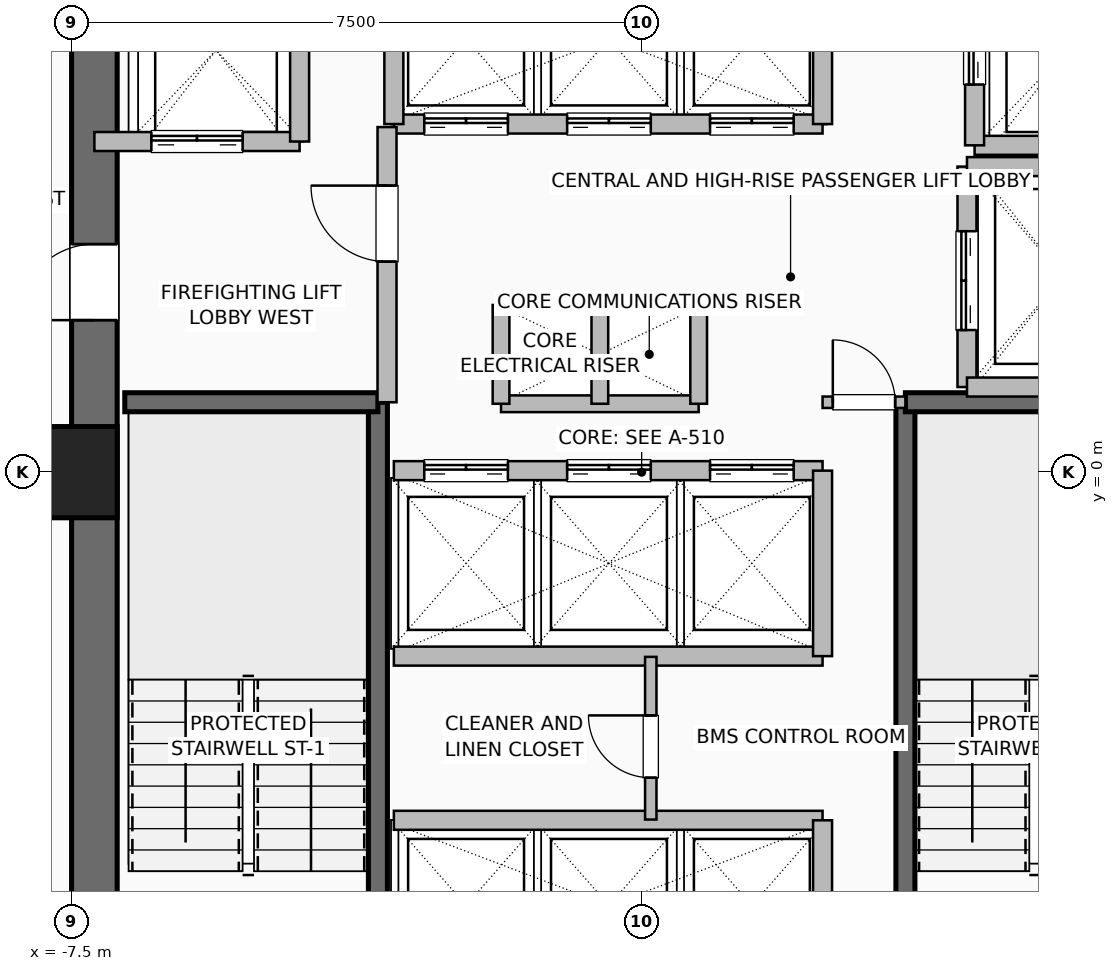
"""IFC4 building model, lengths in metres.
Left out: names, types, materials, properties, quantities, classifications, styles, units other than length and angle.
Written with IfcOpenShell. Run it as: python <this file> out.ifc"""

import sys

from ifc_helpers import new_model, si_unit, direction, frame, frame_2d, origin, origin_2d, place, context, subcontext, project, spatial, rectangle, hollow_rectangle, extrude, element, fill, save


model = new_model("IFC4")
c1 = context("Model", 3, precision=1e-05, world=origin(), true_north=direction((0.0, 1.0)))
c2 = subcontext(c1, "Body", "Model", "MODEL_VIEW")
j1 = project(units=[si_unit("LENGTHUNIT", "METRE"), si_unit("PLANEANGLEUNIT", "RADIAN")], contexts=[c1])
p1 = place(None, origin())
s1 = spatial("IfcSite", under=j1, at=p1, CompositionType="ELEMENT")
p2 = place(p1, origin())
s2 = spatial("IfcBuilding", under=s1, at=p2, CompositionType="ELEMENT")
p3 = place(p2, frame((0.0, 0.0, 34.0)))
s3 = spatial("IfcBuildingStorey", under=s2, at=p3, CompositionType="ELEMENT", Elevation=34.0)
p4 = place(p3, frame((-7.5, 0.0, 0.0), z_axis=(0.0, 0.0, 1.0), x_axis=(1.0, 0.0, 0.0)))
e1 = element("IfcColumn", 1, at=p4, inside=s3, PredefinedType="COLUMN", context=c2, shape_type="SweptSolid", body=[
    extrude(hollow_rectangle(XDim=1.2, YDim=1.2, WallThickness=0.055, at=origin_2d()), origin(), (0.0, 0.0, 1.0), 3.5),
])
p5 = place(p3, frame((-7.2, -7.5, 0.0), z_axis=(0.0, 0.0, 1.0), x_axis=(0.0, 1.0, 0.0)))
e2 = element("IfcWall", 2, at=p5, inside=s3, PredefinedType="SHEAR", context=c2, shape_type="SweptSolid", body=[
    extrude(rectangle(XDim=15.0, YDim=0.6, at=frame_2d((7.5, 0.0))), origin(), (0.0, 0.0, 1.0), 3.25),
])
p6 = place(p5, frame((9.5, 0.0, 0.0)))
e3 = element("IfcOpeningElement", 3, at=p6, cuts=e2, PredefinedType="OPENING", context=c2, shape_type="SweptSolid", body=[
    extrude(rectangle(XDim=1.0, YDim=2.08, at=frame_2d((0.5, 1.04))), frame((0.0, 0.31, 0.0), z_axis=(0.0, -1.0, 0.0), x_axis=(1.0, 0.0, 0.0)), (0.0, 0.0, 1.0), 0.62),
])
p7 = place(p3, frame((-3.47, -6.8, 0.0), z_axis=(0.0, 0.0, 1.0), x_axis=(0.0, 1.0, 0.0)))
e4 = element("IfcWall", 4, at=p7, inside=s3, PredefinedType="SHEAR", context=c2, shape_type="SweptSolid", body=[
    extrude(rectangle(XDim=7.72, YDim=0.25, at=frame_2d((3.86, 0.0))), origin(), (0.0, 0.0, 1.0), 3.25),
])
p8 = place(p3, frame((-6.8, 0.92, 0.0), z_axis=(0.0, 0.0, 1.0), x_axis=(1.0, 0.0, 0.0)))
e5 = element("IfcWall", 5, at=p8, inside=s3, PredefinedType="SHEAR", context=c2, shape_type="SweptSolid", body=[
    extrude(rectangle(XDim=3.33, YDim=0.25, at=frame_2d((1.665, 0.0))), origin(), (0.0, 0.0, 1.0), 3.25),
])
p9 = place(p3, frame((3.47, -6.8, 0.0), z_axis=(0.0, 0.0, 1.0), x_axis=(0.0, 1.0, 0.0)))
e6 = element("IfcWall", 6, at=p9, inside=s3, PredefinedType="SHEAR", context=c2, shape_type="SweptSolid", body=[
    extrude(rectangle(XDim=7.72, YDim=0.25, at=frame_2d((3.86, 0.0))), origin(), (0.0, 0.0, 1.0), 3.25),
])
p10 = place(p3, frame((3.47, 0.92, 0.0), z_axis=(0.0, 0.0, 1.0), x_axis=(1.0, 0.0, 0.0)))
e7 = element("IfcWall", 7, at=p10, inside=s3, PredefinedType="SHEAR", context=c2, shape_type="SweptSolid", body=[
    extrude(rectangle(XDim=3.33, YDim=0.25, at=frame_2d((1.665, 0.0))), origin(), (0.0, 0.0, 1.0), 3.25),
])
for number, where, z_axis, x_axis in (
    (8, (-1.85, 2.2, 0.0), (0.0, 0.0, 1.0), (1.0, 0.0, 0.0)),
    (9, (-1.85, 0.9, 0.0), (0.0, 0.0, 1.0), (1.0, 0.0, 0.0)),
):
    element("IfcWall", number, at=place(p3, frame(where, z_axis=z_axis, x_axis=x_axis)), inside=s3, PredefinedType="PARTITIONING", context=c2, shape_type="SweptSolid", body=[
        extrude(rectangle(XDim=2.6, YDim=0.22, at=frame_2d((1.3, 0.0))), origin(), (0.0, 0.0, 1.0), 3.25),
    ])
for number, where, z_axis, x_axis in (
    (10, (-0.55, 0.9, 0.0), (0.0, 0.0, 1.0), (0.0, 1.0, 0.0)),
    (11, (0.75, 0.9, 0.0), (0.0, 0.0, 1.0), (0.0, 1.0, 0.0)),
    (12, (-1.85, 0.9, 0.0), (0.0, 0.0, 1.0), (0.0, 1.0, 0.0)),
):
    element("IfcWall", number, at=place(p3, frame(where, z_axis=z_axis, x_axis=x_axis)), inside=s3, PredefinedType="PARTITIONING", context=c2, shape_type="SweptSolid", body=[
        extrude(rectangle(XDim=1.3, YDim=0.22, at=frame_2d((0.65, 0.0))), origin(), (0.0, 0.0, 1.0), 3.25),
    ])
p11 = place(p3, frame((-3.26, -4.58, 0.0), z_axis=(0.0, 0.0, 1.0), x_axis=(1.0, 0.0, 0.0)))
e13 = element("IfcWall", 13, at=p11, inside=s3, PredefinedType="SHEAR", context=c2, shape_type="SweptSolid", body=[
    extrude(rectangle(XDim=5.64, YDim=0.25, at=frame_2d((2.82, 0.0))), origin(), (0.0, 0.0, 1.0), 3.25),
])
p12 = place(p3, frame((2.38, -6.8, 0.0), z_axis=(0.0, 0.0, 1.0), x_axis=(0.0, 1.0, 0.0)))
e14 = element("IfcWall", 14, at=p12, inside=s3, PredefinedType="SHEAR", context=c2, shape_type="SweptSolid", body=[
    extrude(rectangle(XDim=2.22, YDim=0.25, at=frame_2d((1.11, 0.0))), origin(), (0.0, 0.0, 1.0), 3.25),
])
p13 = place(p3, frame((-3.26, 0.02, 0.0), z_axis=(0.0, 0.0, 1.0), x_axis=(1.0, 0.0, 0.0)))
e15 = element("IfcWall", 15, at=p13, inside=s3, PredefinedType="SHEAR", context=c2, shape_type="SweptSolid", body=[
    extrude(rectangle(XDim=5.64, YDim=0.25, at=frame_2d((2.82, 0.0))), origin(), (0.0, 0.0, 1.0), 3.25),
])
p14 = place(p13, frame((0.4, 0.0, 0.0)))
e16 = element("IfcOpeningElement", 16, at=p14, cuts=e15, PredefinedType="OPENING", context=c2, shape_type="SweptSolid", body=[
    extrude(rectangle(XDim=1.1, YDim=2.2, at=frame_2d((0.55, 1.1))), frame((0.0, 0.135, 0.0), z_axis=(0.0, -1.0, 0.0), x_axis=(1.0, 0.0, 0.0)), (0.0, 0.0, 1.0), 0.27),
])
p15 = place(p13, frame((2.28, 0.0, 0.0)))
e17 = element("IfcOpeningElement", 17, at=p15, cuts=e15, PredefinedType="OPENING", context=c2, shape_type="SweptSolid", body=[
    extrude(rectangle(XDim=1.1, YDim=2.2, at=frame_2d((0.55, 1.1))), frame((0.0, 0.135, 0.0), z_axis=(0.0, -1.0, 0.0), x_axis=(1.0, 0.0, 0.0)), (0.0, 0.0, 1.0), 0.27),
])
p16 = place(p13, frame((4.16, 0.0, 0.0)))
e18 = element("IfcOpeningElement", 18, at=p16, cuts=e15, PredefinedType="OPENING", context=c2, shape_type="SweptSolid", body=[
    extrude(rectangle(XDim=1.1, YDim=2.2, at=frame_2d((0.55, 1.1))), frame((0.0, 0.135, 0.0), z_axis=(0.0, -1.0, 0.0), x_axis=(1.0, 0.0, 0.0)), (0.0, 0.0, 1.0), 0.27),
])
p17 = place(p3, frame((-3.26, -2.42, 0.0), z_axis=(0.0, 0.0, 1.0), x_axis=(1.0, 0.0, 0.0)))
e19 = element("IfcWall", 19, at=p17, inside=s3, PredefinedType="SHEAR", context=c2, shape_type="SweptSolid", body=[
    extrude(rectangle(XDim=5.64, YDim=0.25, at=frame_2d((2.82, 0.0))), origin(), (0.0, 0.0, 1.0), 3.25),
])
p18 = place(p3, frame((2.38, -2.42, 0.0), z_axis=(0.0, 0.0, 1.0), x_axis=(0.0, 1.0, 0.0)))
e20 = element("IfcWall", 20, at=p18, inside=s3, PredefinedType="SHEAR", context=c2, shape_type="SweptSolid", body=[
    extrude(rectangle(XDim=2.44, YDim=0.25, at=frame_2d((1.22, 0.0))), origin(), (0.0, 0.0, 1.0), 3.25),
])
p19 = place(p3, frame((-3.26, 4.58, 0.0), z_axis=(0.0, 0.0, 1.0), x_axis=(1.0, 0.0, 0.0)))
e21 = element("IfcWall", 21, at=p19, inside=s3, PredefinedType="SHEAR", context=c2, shape_type="SweptSolid", body=[
    extrude(rectangle(XDim=5.64, YDim=0.25, at=frame_2d((2.82, 0.0))), origin(), (0.0, 0.0, 1.0), 3.25),
])
p20 = place(p19, frame((0.4, 0.0, 0.0)))
e22 = element("IfcOpeningElement", 22, at=p20, cuts=e21, PredefinedType="OPENING", context=c2, shape_type="SweptSolid", body=[
    extrude(rectangle(XDim=1.1, YDim=2.2, at=frame_2d((0.55, 1.1))), frame((0.0, 0.135, 0.0), z_axis=(0.0, -1.0, 0.0), x_axis=(1.0, 0.0, 0.0)), (0.0, 0.0, 1.0), 0.27),
])
p21 = place(p19, frame((2.28, 0.0, 0.0)))
e23 = element("IfcOpeningElement", 23, at=p21, cuts=e21, PredefinedType="OPENING", context=c2, shape_type="SweptSolid", body=[
    extrude(rectangle(XDim=1.1, YDim=2.2, at=frame_2d((0.55, 1.1))), frame((0.0, 0.135, 0.0), z_axis=(0.0, -1.0, 0.0), x_axis=(1.0, 0.0, 0.0)), (0.0, 0.0, 1.0), 0.27),
])
p22 = place(p19, frame((4.16, 0.0, 0.0)))
e24 = element("IfcOpeningElement", 24, at=p22, cuts=e21, PredefinedType="OPENING", context=c2, shape_type="SweptSolid", body=[
    extrude(rectangle(XDim=1.1, YDim=2.2, at=frame_2d((0.55, 1.1))), frame((0.0, 0.135, 0.0), z_axis=(0.0, -1.0, 0.0), x_axis=(1.0, 0.0, 0.0)), (0.0, 0.0, 1.0), 0.27),
])
for number, where, z_axis, x_axis in (
    (25, (-3.26, 4.58, 0.0), (0.0, 0.0, 1.0), (0.0, 1.0, 0.0)),
    (26, (2.38, 4.58, 0.0), (0.0, 0.0, 1.0), (0.0, 1.0, 0.0)),
):
    element("IfcWall", number, at=place(p3, frame(where, z_axis=z_axis, x_axis=x_axis)), inside=s3, PredefinedType="SHEAR", context=c2, shape_type="SweptSolid", body=[
        extrude(rectangle(XDim=2.22, YDim=0.25, at=frame_2d((1.11, 0.0))), origin(), (0.0, 0.0, 1.0), 3.25),
    ])
p23 = place(p3, frame((-7.2, 4.35, 0.0), z_axis=(0.0, 0.0, 1.0), x_axis=(1.0, 0.0, 0.0)))
e27 = element("IfcWall", 27, at=p23, inside=s3, PredefinedType="SHEAR", context=c2, shape_type="SweptSolid", body=[
    extrude(rectangle(XDim=2.7, YDim=0.25, at=frame_2d((1.35, 0.0))), origin(), (0.0, 0.0, 1.0), 3.25),
])
p24 = place(p23, frame((0.75, 0.0, 0.0)))
e28 = element("IfcOpeningElement", 28, at=p24, cuts=e27, PredefinedType="OPENING", context=c2, shape_type="SweptSolid", body=[
    extrude(rectangle(XDim=1.2, YDim=2.2, at=frame_2d((0.6, 1.1))), frame((0.0, 0.135, 0.0), z_axis=(0.0, -1.0, 0.0), x_axis=(1.0, 0.0, 0.0)), (0.0, 0.0, 1.0), 0.27),
])
p25 = place(p3, frame((-4.5, 4.35, 0.0), z_axis=(0.0, 0.0, 1.0), x_axis=(0.0, 1.0, 0.0)))
e29 = element("IfcWall", 29, at=p25, inside=s3, PredefinedType="SHEAR", context=c2, shape_type="SweptSolid", body=[
    extrude(rectangle(XDim=2.85, YDim=0.25, at=frame_2d((1.425, 0.0))), origin(), (0.0, 0.0, 1.0), 3.25),
])
p26 = place(p3, frame((4.38, 4.3, 0.0), z_axis=(0.0, 0.0, 1.0), x_axis=(1.0, 0.0, 0.0)))
e30 = element("IfcWall", 30, at=p26, inside=s3, PredefinedType="SHEAR", context=c2, shape_type="SweptSolid", body=[
    extrude(rectangle(XDim=2.42, YDim=0.25, at=frame_2d((1.21, 0.0))), origin(), (0.0, 0.0, 1.0), 3.25),
])
p27 = place(p3, frame((4.38, 4.3, 0.0), z_axis=(0.0, 0.0, 1.0), x_axis=(0.0, 1.0, 0.0)))
e31 = element("IfcWall", 31, at=p27, inside=s3, PredefinedType="SHEAR", context=c2, shape_type="SweptSolid", body=[
    extrude(rectangle(XDim=2.5, YDim=0.25, at=frame_2d((1.25, 0.0))), origin(), (0.0, 0.0, 1.0), 3.25),
])
p28 = place(p27, frame((0.8, 0.0, 0.0)))
e32 = element("IfcOpeningElement", 32, at=p28, cuts=e31, PredefinedType="OPENING", context=c2, shape_type="SweptSolid", body=[
    extrude(rectangle(XDim=1.2, YDim=2.2, at=frame_2d((0.6, 1.1))), frame((0.0, 0.135, 0.0), z_axis=(0.0, -1.0, 0.0), x_axis=(1.0, 0.0, 0.0)), (0.0, 0.0, 1.0), 0.27),
])
p29 = place(p3, frame((4.28, 1.12, 0.0), z_axis=(0.0, 0.0, 1.0), x_axis=(0.0, 1.0, 0.0)))
e33 = element("IfcWall", 33, at=p29, inside=s3, PredefinedType="SHEAR", context=c2, shape_type="SweptSolid", body=[
    extrude(rectangle(XDim=2.9, YDim=0.25, at=frame_2d((1.45, 0.0))), origin(), (0.0, 0.0, 1.0), 3.25),
])
p30 = place(p29, frame((0.75, 0.0, 0.0)))
e34 = element("IfcOpeningElement", 34, at=p30, cuts=e33, PredefinedType="OPENING", context=c2, shape_type="SweptSolid", body=[
    extrude(rectangle(XDim=1.3, YDim=2.3, at=frame_2d((0.65, 1.15))), frame((0.0, 0.135, 0.0), z_axis=(0.0, -1.0, 0.0), x_axis=(1.0, 0.0, 0.0)), (0.0, 0.0, 1.0), 0.27),
])
for number, where, z_axis, x_axis in (
    (35, (4.28, 1.12, 0.0), (0.0, 0.0, 1.0), (1.0, 0.0, 0.0)),
    (36, (4.28, 4.02, 0.0), (0.0, 0.0, 1.0), (1.0, 0.0, 0.0)),
):
    element("IfcWall", number, at=place(p3, frame(where, z_axis=z_axis, x_axis=x_axis)), inside=s3, PredefinedType="SHEAR", context=c2, shape_type="SweptSolid", body=[
        extrude(rectangle(XDim=2.52, YDim=0.25, at=frame_2d((1.26, 0.0))), origin(), (0.0, 0.0, 1.0), 3.25),
    ])
p31 = place(p3, frame((-3.35, 0.92, 0.0), z_axis=(0.0, 0.0, 1.0), x_axis=(0.0, 1.0, 0.0)))
e37 = element("IfcWall", 37, at=p31, inside=s3, PredefinedType="SHEAR", context=c2, shape_type="SweptSolid", body=[
    extrude(rectangle(XDim=3.62, YDim=0.25, at=frame_2d((1.81, 0.0))), origin(), (0.0, 0.0, 1.0), 3.25),
])
p32 = place(p31, frame((1.85, 0.0, 0.0)))
e38 = element("IfcOpeningElement", 38, at=p32, cuts=e37, PredefinedType="OPENING", context=c2, shape_type="SweptSolid", body=[
    extrude(rectangle(XDim=1.0, YDim=2.08, at=frame_2d((0.5, 1.04))), frame((0.0, 0.135, 0.0), z_axis=(0.0, -1.0, 0.0), x_axis=(1.0, 0.0, 0.0)), (0.0, 0.0, 1.0), 0.27),
])
p33 = place(p3, frame((2.38, 0.92, 0.0), z_axis=(0.0, 0.0, 1.0), x_axis=(1.0, 0.0, 0.0)))
e39 = element("IfcWall", 39, at=p33, inside=s3, PredefinedType="PARTITIONING", context=c2, shape_type="SweptSolid", body=[
    extrude(rectangle(XDim=1.09, YDim=0.15, at=frame_2d((0.545, 0.0))), origin(), (0.0, 0.0, 1.0), 3.25),
])
p34 = place(p33, frame((0.135, 0.0, 0.0)))
e40 = element("IfcOpeningElement", 40, at=p34, cuts=e39, PredefinedType="OPENING", context=c2, shape_type="SweptSolid", body=[
    extrude(rectangle(XDim=0.82, YDim=2.05, at=frame_2d((0.41, 1.025))), frame((0.0, 0.085, 0.0), z_axis=(0.0, -1.0, 0.0), x_axis=(1.0, 0.0, 0.0)), (0.0, 0.0, 1.0), 0.17),
])
p35 = place(p3, frame((0.12, -4.57, 0.0), z_axis=(0.0, 0.0, 1.0), x_axis=(0.0, 1.0, 0.0)))
e41 = element("IfcWall", 41, at=p35, inside=s3, PredefinedType="PARTITIONING", context=c2, shape_type="SweptSolid", body=[
    extrude(rectangle(XDim=2.14, YDim=0.15, at=frame_2d((1.07, 0.0))), origin(), (0.0, 0.0, 1.0), 3.25),
])
p36 = place(p35, frame((0.55, 0.0, 0.0)))
e42 = element("IfcOpeningElement", 42, at=p36, cuts=e41, PredefinedType="OPENING", context=c2, shape_type="SweptSolid", body=[
    extrude(rectangle(XDim=0.82, YDim=2.05, at=frame_2d((0.41, 1.025))), frame((0.0, 0.085, 0.0), z_axis=(0.0, -1.0, 0.0), x_axis=(1.0, 0.0, 0.0)), (0.0, 0.0, 1.0), 0.17),
])
p37 = place(p6, origin())
e43 = element("IfcDoor", 43, at=p37, inside=s3, OperationType="SINGLE_SWING_LEFT", PredefinedType="DOOR", context=c2, shape_type="SweptSolid", body=[
    extrude(rectangle(XDim=1.0, YDim=2.08, at=frame_2d((0.5, 1.04))), frame((0.0, 0.025, 0.0), z_axis=(0.0, -1.0, 0.0), x_axis=(1.0, 0.0, 0.0)), (0.0, 0.0, 1.0), 0.05),
])
fill(e3, e43)
p38 = place(p14, origin())
e44 = element("IfcDoor", 44, at=p38, inside=s3, OperationType="DOUBLE_DOOR_SLIDING", PredefinedType="DOOR", context=c2, shape_type="SweptSolid", body=[
    extrude(rectangle(XDim=1.1, YDim=2.2, at=frame_2d((0.55, 1.1))), frame((0.0, 0.025, 0.0), z_axis=(0.0, -1.0, 0.0), x_axis=(1.0, 0.0, 0.0)), (0.0, 0.0, 1.0), 0.05),
])
fill(e16, e44)
p39 = place(p15, origin())
e45 = element("IfcDoor", 45, at=p39, inside=s3, OperationType="DOUBLE_DOOR_SLIDING", PredefinedType="DOOR", context=c2, shape_type="SweptSolid", body=[
    extrude(rectangle(XDim=1.1, YDim=2.2, at=frame_2d((0.55, 1.1))), frame((0.0, 0.025, 0.0), z_axis=(0.0, -1.0, 0.0), x_axis=(1.0, 0.0, 0.0)), (0.0, 0.0, 1.0), 0.05),
])
fill(e17, e45)
p40 = place(p16, origin())
e46 = element("IfcDoor", 46, at=p40, inside=s3, OperationType="DOUBLE_DOOR_SLIDING", PredefinedType="DOOR", context=c2, shape_type="SweptSolid", body=[
    extrude(rectangle(XDim=1.1, YDim=2.2, at=frame_2d((0.55, 1.1))), frame((0.0, 0.025, 0.0), z_axis=(0.0, -1.0, 0.0), x_axis=(1.0, 0.0, 0.0)), (0.0, 0.0, 1.0), 0.05),
])
fill(e18, e46)
p41 = place(p20, origin())
e47 = element("IfcDoor", 47, at=p41, inside=s3, OperationType="DOUBLE_DOOR_SLIDING", PredefinedType="DOOR", context=c2, shape_type="SweptSolid", body=[
    extrude(rectangle(XDim=1.1, YDim=2.2, at=frame_2d((0.55, 1.1))), frame((0.0, 0.025, 0.0), z_axis=(0.0, -1.0, 0.0), x_axis=(1.0, 0.0, 0.0)), (0.0, 0.0, 1.0), 0.05),
])
fill(e22, e47)
p42 = place(p21, origin())
e48 = element("IfcDoor", 48, at=p42, inside=s3, OperationType="DOUBLE_DOOR_SLIDING", PredefinedType="DOOR", context=c2, shape_type="SweptSolid", body=[
    extrude(rectangle(XDim=1.1, YDim=2.2, at=frame_2d((0.55, 1.1))), frame((0.0, 0.025, 0.0), z_axis=(0.0, -1.0, 0.0), x_axis=(1.0, 0.0, 0.0)), (0.0, 0.0, 1.0), 0.05),
])
fill(e23, e48)
p43 = place(p22, origin())
e49 = element("IfcDoor", 49, at=p43, inside=s3, OperationType="DOUBLE_DOOR_SLIDING", PredefinedType="DOOR", context=c2, shape_type="SweptSolid", body=[
    extrude(rectangle(XDim=1.1, YDim=2.2, at=frame_2d((0.55, 1.1))), frame((0.0, 0.025, 0.0), z_axis=(0.0, -1.0, 0.0), x_axis=(1.0, 0.0, 0.0)), (0.0, 0.0, 1.0), 0.05),
])
fill(e24, e49)
p44 = place(p24, origin())
e50 = element("IfcDoor", 50, at=p44, inside=s3, OperationType="DOUBLE_DOOR_SLIDING", PredefinedType="DOOR", context=c2, shape_type="SweptSolid", body=[
    extrude(rectangle(XDim=1.2, YDim=2.2, at=frame_2d((0.6, 1.1))), frame((0.0, 0.025, 0.0), z_axis=(0.0, -1.0, 0.0), x_axis=(1.0, 0.0, 0.0)), (0.0, 0.0, 1.0), 0.05),
])
fill(e28, e50)
p45 = place(p28, origin())
e51 = element("IfcDoor", 51, at=p45, inside=s3, OperationType="DOUBLE_DOOR_SLIDING", PredefinedType="DOOR", context=c2, shape_type="SweptSolid", body=[
    extrude(rectangle(XDim=1.2, YDim=2.2, at=frame_2d((0.6, 1.1))), frame((0.0, 0.025, 0.0), z_axis=(0.0, -1.0, 0.0), x_axis=(1.0, 0.0, 0.0)), (0.0, 0.0, 1.0), 0.05),
])
fill(e32, e51)
p46 = place(p30, origin())
e52 = element("IfcDoor", 52, at=p46, inside=s3, OperationType="DOUBLE_DOOR_SLIDING", PredefinedType="DOOR", context=c2, shape_type="SweptSolid", body=[
    extrude(rectangle(XDim=1.3, YDim=2.3, at=frame_2d((0.65, 1.15))), frame((0.0, 0.025, 0.0), z_axis=(0.0, -1.0, 0.0), x_axis=(1.0, 0.0, 0.0)), (0.0, 0.0, 1.0), 0.05),
])
fill(e34, e52)
p47 = place(p32, origin())
e53 = element("IfcDoor", 53, at=p47, inside=s3, OperationType="SINGLE_SWING_RIGHT", PredefinedType="DOOR", context=c2, shape_type="SweptSolid", body=[
    extrude(rectangle(XDim=1.0, YDim=2.08, at=frame_2d((0.5, 1.04))), frame((0.0, 0.025, 0.0), z_axis=(0.0, -1.0, 0.0), x_axis=(1.0, 0.0, 0.0)), (0.0, 0.0, 1.0), 0.05),
])
fill(e38, e53)
p48 = place(p34, origin())
e54 = element("IfcDoor", 54, at=p48, inside=s3, OperationType="SINGLE_SWING_LEFT", PredefinedType="DOOR", context=c2, shape_type="SweptSolid", body=[
    extrude(rectangle(XDim=0.82, YDim=2.05, at=frame_2d((0.41, 1.025))), frame((0.0, 0.025, 0.0), z_axis=(0.0, -1.0, 0.0), x_axis=(1.0, 0.0, 0.0)), (0.0, 0.0, 1.0), 0.05),
])
fill(e40, e54)
p49 = place(p36, origin())
e55 = element("IfcDoor", 55, at=p49, inside=s3, OperationType="SINGLE_SWING_RIGHT", PredefinedType="DOOR", context=c2, shape_type="SweptSolid", body=[
    extrude(rectangle(XDim=0.82, YDim=2.05, at=frame_2d((0.41, 1.025))), frame((0.0, 0.025, 0.0), z_axis=(0.0, -1.0, 0.0), x_axis=(1.0, 0.0, 0.0)), (0.0, 0.0, 1.0), 0.05),
])
fill(e42, e55)
save(model, sys.argv[1])
